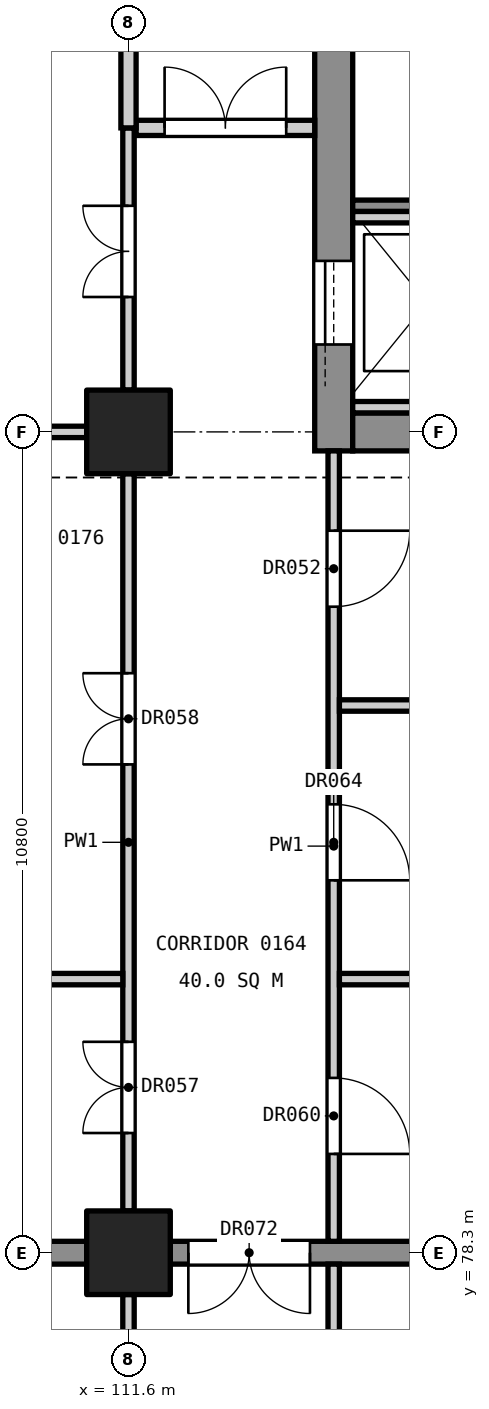
"""IFC4 building model, lengths in metres.
Left out: names, types, materials, properties, quantities, classifications, styles, units other than length and angle.
Written with IfcOpenShell. Run it as: python <this file> out.ifc"""

import sys

from ifc_helpers import new_model, si_unit, direction, frame, frame_2d, origin, origin_2d, place, context, subcontext, project, spatial, rectangle, extrude, element, fill, save


model = new_model("IFC4")
c1 = context("Model", 3, precision=1e-05, world=origin(), true_north=direction((0.0, 1.0)))
c2 = subcontext(c1, "Body", "Model", "MODEL_VIEW")
j1 = project(units=[si_unit("LENGTHUNIT", "METRE"), si_unit("PLANEANGLEUNIT", "RADIAN")], contexts=[c1])
p1 = place(None, origin())
s1 = spatial("IfcSite", under=j1, at=p1, CompositionType="ELEMENT")
p2 = place(p1, origin())
s2 = spatial("IfcBuilding", under=s1, at=p2, CompositionType="ELEMENT")
p3 = place(p2, frame((0.0, 0.0, 6.0)))
s3 = spatial("IfcBuildingStorey", under=s2, at=p3, CompositionType="ELEMENT", Elevation=6.0)
for number, where, z_axis, x_axis in (
    (1, (111.6, 78.3, 0.0), (0.0, 0.0, 1.0), (1.0, 0.0, 0.0)),
    (2, (111.6, 89.1, 0.0), (0.0, 0.0, 1.0), (1.0, 0.0, 0.0)),
):
    element("IfcColumn", number, at=place(p3, frame(where, z_axis=z_axis, x_axis=x_axis)), inside=s3, PredefinedType="COLUMN", context=c2, shape_type="SweptSolid", body=[
        extrude(rectangle(XDim=1.1, YDim=1.1, at=origin_2d()), origin(), (0.0, 0.0, 1.0), 5.4),
    ])
p4 = place(p3, frame((114.3, 88.85, 0.0), z_axis=(0.0, 0.0, 1.0), x_axis=(0.0, 1.0, 0.0)))
e3 = element("IfcWall", 3, at=p4, inside=s3, PredefinedType="SHEAR", context=c2, shape_type="SweptSolid", body=[
    extrude(rectangle(XDim=11.3, YDim=0.5, at=frame_2d((5.65, 0.0))), origin(), (0.0, 0.0, 1.0), 5.1),
])
p5 = place(p4, frame((9.35, 0.0, 0.0)))
e4 = element("IfcOpeningElement", 4, at=p5, cuts=e3, PredefinedType="OPENING", context=c2, shape_type="SweptSolid", body=[
    extrude(rectangle(XDim=1.4, YDim=2.1, at=frame_2d((0.7, 1.05))), frame((0.0, 0.26, 0.0), z_axis=(0.0, -1.0, 0.0), x_axis=(1.0, 0.0, 0.0)), (0.0, 0.0, 1.0), 0.52),
])
p6 = place(p4, frame((1.4, 0.0, 0.0)))
e5 = element("IfcOpeningElement", 5, at=p6, cuts=e3, PredefinedType="OPENING", context=c2, shape_type="SweptSolid", body=[
    extrude(rectangle(XDim=1.1, YDim=2.1, at=frame_2d((0.55, 1.05))), frame((0.0, 0.26, 0.0), z_axis=(0.0, -1.0, 0.0), x_axis=(1.0, 0.0, 0.0)), (0.0, 0.0, 1.0), 0.52),
])
p7 = place(p3, frame((118.55, 89.1, 0.0), z_axis=(0.0, 0.0, 1.0), x_axis=(-1.0, 0.0, 0.0)))
e6 = element("IfcWall", 6, at=p7, inside=s3, PredefinedType="SHEAR", context=c2, shape_type="SweptSolid", body=[
    extrude(rectangle(XDim=4.0, YDim=0.5, at=frame_2d((2.0, 0.0))), origin(), (0.0, 0.0, 1.0), 5.1),
])
p8 = place(p3, frame((118.25, 78.3, 0.0), z_axis=(0.0, 0.0, 1.0), x_axis=(-1.0, 0.0, 0.0)))
e7 = element("IfcWall", 7, at=p8, inside=s3, PredefinedType="SHEAR", context=c2, shape_type="SweptSolid", body=[
    extrude(rectangle(XDim=6.1, YDim=0.3, at=frame_2d((3.05, 0.0))), origin(), (0.0, 0.0, 1.0), 5.1),
])
p9 = place(p8, frame((4.262, 0.0, 0.0)))
e8 = element("IfcOpeningElement", 8, at=p9, cuts=e7, PredefinedType="OPENING", context=c2, shape_type="SweptSolid", body=[
    extrude(rectangle(XDim=1.6, YDim=2.1, at=frame_2d((0.8, 1.05))), frame((0.0, 0.16, 0.0), z_axis=(0.0, -1.0, 0.0), x_axis=(1.0, 0.0, 0.0)), (0.0, 0.0, 1.0), 0.32),
])
p10 = place(p3, frame((111.05, 78.3, 0.0), z_axis=(0.0, 0.0, 1.0), x_axis=(-1.0, 0.0, 0.0)))
e9 = element("IfcWall", 9, at=p10, inside=s3, PredefinedType="SHEAR", context=c2, shape_type="SweptSolid", body=[
    extrude(rectangle(XDim=9.7, YDim=0.3, at=frame_2d((4.85, 0.0))), origin(), (0.0, 0.0, 1.0), 5.1),
])
p11 = place(p3, frame((118.55, 92.075, 0.0), z_axis=(0.0, 0.0, 1.0), x_axis=(-1.0, 0.0, 0.0)))
e10 = element("IfcWall", 10, at=p11, inside=s3, PredefinedType="SOLIDWALL", context=c2, shape_type="SweptSolid", body=[
    extrude(rectangle(XDim=4.0, YDim=0.15, at=frame_2d((2.0, 0.0))), origin(), (0.0, 0.0, 1.0), 5.1),
])
for number, where, z_axis, x_axis in (
    (11, (116.35, 91.925, 0.0), (0.0, 0.0, 1.0), (-1.0, 0.0, 0.0)),
    (12, (116.35, 89.425, 0.0), (0.0, 0.0, 1.0), (-1.0, 0.0, 0.0)),
):
    element("IfcWall", number, at=place(p3, frame(where, z_axis=z_axis, x_axis=x_axis)), inside=s3, PredefinedType="SOLIDWALL", context=c2, shape_type="SweptSolid", body=[
        extrude(rectangle(XDim=1.8, YDim=0.15, at=frame_2d((0.9, 0.0))), origin(), (0.0, 0.0, 1.0), 5.4),
    ])
p12 = place(p3, frame((114.3, 74.95, 0.0), z_axis=(0.0, 0.0, 1.0), x_axis=(0.0, 1.0, 0.0)))
e13 = element("IfcWall", 13, at=p12, inside=s3, PredefinedType="PARTITIONING", context=c2, shape_type="SweptSolid", body=[
    extrude(rectangle(XDim=3.2, YDim=0.15, at=frame_2d((1.6, 0.0))), origin(), (0.0, 0.0, 1.0), 4.0),
])
p13 = place(p12, frame((1.05, 0.0, 0.0)))
e14 = element("IfcOpeningElement", 14, at=p13, cuts=e13, PredefinedType="OPENING", context=c2, shape_type="SweptSolid", body=[
    extrude(rectangle(XDim=1.0, YDim=2.1, at=frame_2d((0.5, 1.05))), frame((0.0, 0.085, 0.0), z_axis=(0.0, -1.0, 0.0), x_axis=(1.0, 0.0, 0.0)), (0.0, 0.0, 1.0), 0.17),
])
p14 = place(p3, frame((114.3, 78.45, 0.0), z_axis=(0.0, 0.0, 1.0), x_axis=(0.0, 1.0, 0.0)))
e15 = element("IfcWall", 15, at=p14, inside=s3, PredefinedType="PARTITIONING", context=c2, shape_type="SweptSolid", body=[
    extrude(rectangle(XDim=10.4, YDim=0.15, at=frame_2d((5.2, 0.0))), origin(), (0.0, 0.0, 1.0), 4.0),
])
p15 = place(p14, frame((8.35, 0.0, 0.0)))
e16 = element("IfcOpeningElement", 16, at=p15, cuts=e15, PredefinedType="OPENING", context=c2, shape_type="SweptSolid", body=[
    extrude(rectangle(XDim=1.0, YDim=2.1, at=frame_2d((0.5, 1.05))), frame((0.0, 0.085, 0.0), z_axis=(0.0, -1.0, 0.0), x_axis=(1.0, 0.0, 0.0)), (0.0, 0.0, 1.0), 0.17),
])
p16 = place(p14, frame((1.15, 0.0, 0.0)))
e17 = element("IfcOpeningElement", 17, at=p16, cuts=e15, PredefinedType="OPENING", context=c2, shape_type="SweptSolid", body=[
    extrude(rectangle(XDim=1.0, YDim=2.1, at=frame_2d((0.5, 1.05))), frame((0.0, 0.085, 0.0), z_axis=(0.0, -1.0, 0.0), x_axis=(1.0, 0.0, 0.0)), (0.0, 0.0, 1.0), 0.17),
])
p17 = place(p14, frame((4.75, 0.0, 0.0)))
e18 = element("IfcOpeningElement", 18, at=p17, cuts=e15, PredefinedType="OPENING", context=c2, shape_type="SweptSolid", body=[
    extrude(rectangle(XDim=1.0, YDim=2.1, at=frame_2d((0.5, 1.05))), frame((0.0, 0.085, 0.0), z_axis=(0.0, -1.0, 0.0), x_axis=(1.0, 0.0, 0.0)), (0.0, 0.0, 1.0), 0.17),
])
for number, where, z_axis, x_axis in (
    (19, (118.65, 81.9, 0.0), (0.0, 0.0, 1.0), (-1.0, 0.0, 0.0)),
    (20, (118.65, 85.5, 0.0), (0.0, 0.0, 1.0), (-1.0, 0.0, 0.0)),
):
    element("IfcWall", number, at=place(p3, frame(where, z_axis=z_axis, x_axis=x_axis)), inside=s3, PredefinedType="PARTITIONING", context=c2, shape_type="SweptSolid", body=[
        extrude(rectangle(XDim=4.275, YDim=0.15, at=frame_2d((2.137, 0.0))), origin(), (0.0, 0.0, 1.0), 4.3),
    ])
p18 = place(p3, frame((114.05, 93.1, 0.0), z_axis=(0.0, 0.0, 1.0), x_axis=(-1.0, 0.0, 0.0)))
e21 = element("IfcWall", 21, at=p18, inside=s3, PredefinedType="PARTITIONING", context=c2, shape_type="SweptSolid", body=[
    extrude(rectangle(XDim=2.35, YDim=0.2, at=frame_2d((1.175, 0.0))), origin(), (0.0, 0.0, 1.0), 4.0),
])
p19 = place(p18, frame((0.375, 0.0, 0.0)))
e22 = element("IfcOpeningElement", 22, at=p19, cuts=e21, PredefinedType="OPENING", context=c2, shape_type="SweptSolid", body=[
    extrude(rectangle(XDim=1.6, YDim=2.1, at=frame_2d((0.8, 1.05))), frame((0.0, 0.11, 0.0), z_axis=(0.0, -1.0, 0.0), x_axis=(1.0, 0.0, 0.0)), (0.0, 0.0, 1.0), 0.22),
])
p20 = place(p3, frame((111.6, 70.8, 0.0), z_axis=(0.0, 0.0, 1.0), x_axis=(0.0, 1.0, 0.0)))
e23 = element("IfcWall", 23, at=p20, inside=s3, PredefinedType="PARTITIONING", context=c2, shape_type="SweptSolid", body=[
    extrude(rectangle(XDim=6.95, YDim=0.15, at=frame_2d((3.475, 0.0))), origin(), (0.0, 0.0, 1.0), 4.0),
])
p21 = place(p20, frame((3.125, 0.0, 0.0)))
e24 = element("IfcOpeningElement", 24, at=p21, cuts=e23, PredefinedType="OPENING", context=c2, shape_type="SweptSolid", body=[
    extrude(rectangle(XDim=1.2, YDim=2.1, at=frame_2d((0.6, 1.05))), frame((0.0, 0.085, 0.0), z_axis=(0.0, -1.0, 0.0), x_axis=(1.0, 0.0, 0.0)), (0.0, 0.0, 1.0), 0.17),
])
p22 = place(p3, frame((111.6, 78.85, 0.0), z_axis=(0.0, 0.0, 1.0), x_axis=(0.0, 1.0, 0.0)))
e25 = element("IfcWall", 25, at=p22, inside=s3, PredefinedType="PARTITIONING", context=c2, shape_type="SweptSolid", body=[
    extrude(rectangle(XDim=9.7, YDim=0.15, at=frame_2d((4.85, 0.0))), origin(), (0.0, 0.0, 1.0), 4.0),
])
p23 = place(p22, frame((1.025, 0.0, 0.0)))
e26 = element("IfcOpeningElement", 26, at=p23, cuts=e25, PredefinedType="OPENING", context=c2, shape_type="SweptSolid", body=[
    extrude(rectangle(XDim=1.2, YDim=2.1, at=frame_2d((0.6, 1.05))), frame((0.0, 0.085, 0.0), z_axis=(0.0, -1.0, 0.0), x_axis=(1.0, 0.0, 0.0)), (0.0, 0.0, 1.0), 0.17),
])
p24 = place(p22, frame((5.875, 0.0, 0.0)))
e27 = element("IfcOpeningElement", 27, at=p24, cuts=e25, PredefinedType="OPENING", context=c2, shape_type="SweptSolid", body=[
    extrude(rectangle(XDim=1.2, YDim=2.1, at=frame_2d((0.6, 1.05))), frame((0.0, 0.085, 0.0), z_axis=(0.0, -1.0, 0.0), x_axis=(1.0, 0.0, 0.0)), (0.0, 0.0, 1.0), 0.17),
])
p25 = place(p3, frame((111.6, 89.65, 0.0), z_axis=(0.0, 0.0, 1.0), x_axis=(0.0, 1.0, 0.0)))
e28 = element("IfcWall", 28, at=p25, inside=s3, PredefinedType="PARTITIONING", context=c2, shape_type="SweptSolid", body=[
    extrude(rectangle(XDim=3.45, YDim=0.15, at=frame_2d((1.725, 0.0))), origin(), (0.0, 0.0, 1.0), 4.0),
])
p26 = place(p25, frame((1.225, 0.0, 0.0)))
e29 = element("IfcOpeningElement", 29, at=p26, cuts=e28, PredefinedType="OPENING", context=c2, shape_type="SweptSolid", body=[
    extrude(rectangle(XDim=1.2, YDim=2.1, at=frame_2d((0.6, 1.05))), frame((0.0, 0.085, 0.0), z_axis=(0.0, -1.0, 0.0), x_axis=(1.0, 0.0, 0.0)), (0.0, 0.0, 1.0), 0.17),
])
p27 = place(p3, frame((111.6, 93.1, 0.0), z_axis=(0.0, 0.0, 1.0), x_axis=(0.0, 1.0, 0.0)))
e30 = element("IfcWall", 30, at=p27, inside=s3, PredefinedType="PARTITIONING", context=c2, shape_type="SweptSolid", body=[
    extrude(rectangle(XDim=6.25, YDim=0.2, at=frame_2d((3.125, 0.0))), origin(), (0.0, 0.0, 1.0), 4.0),
])
p28 = place(p3, frame((111.525, 81.9, 0.0), z_axis=(0.0, 0.0, 1.0), x_axis=(-1.0, 0.0, 0.0)))
e31 = element("IfcWall", 31, at=p28, inside=s3, PredefinedType="PARTITIONING", context=c2, shape_type="SweptSolid", body=[
    extrude(rectangle(XDim=10.575, YDim=0.15, at=frame_2d((5.288, 0.0))), origin(), (0.0, 0.0, 1.0), 4.3),
])
p29 = place(p3, frame((111.05, 89.1, 0.0), z_axis=(0.0, 0.0, 1.0), x_axis=(-1.0, 0.0, 0.0)))
e32 = element("IfcWall", 32, at=p29, inside=s3, PredefinedType="PARTITIONING", context=c2, shape_type="SweptSolid", body=[
    extrude(rectangle(XDim=9.7, YDim=0.15, at=frame_2d((4.85, 0.0))), origin(), (0.0, 0.0, 1.0), 4.3),
])
p30 = place(p6, origin())
e33 = element("IfcDoor", 33, at=p30, inside=s3, OperationType="SLIDING_TO_LEFT", PredefinedType="DOOR", context=c2, shape_type="SweptSolid", body=[
    extrude(rectangle(XDim=1.1, YDim=2.1, at=frame_2d((0.55, 1.05))), frame((0.0, 0.025, 0.0), z_axis=(0.0, -1.0, 0.0), x_axis=(1.0, 0.0, 0.0)), (0.0, 0.0, 1.0), 0.05),
])
fill(e5, e33)
p31 = place(p15, frame((1.0, 0.0, 0.0), z_axis=(0.0, 0.0, 1.0), x_axis=(-1.0, 0.0, 0.0)))
e34 = element("IfcDoor", 34, at=p31, inside=s3, OperationType="SINGLE_SWING_LEFT", PredefinedType="DOOR", context=c2, shape_type="SweptSolid", body=[
    extrude(rectangle(XDim=1.0, YDim=2.1, at=frame_2d((0.5, 1.05))), frame((0.0, 0.025, 0.0), z_axis=(0.0, -1.0, 0.0), x_axis=(1.0, 0.0, 0.0)), (0.0, 0.0, 1.0), 0.05),
])
fill(e16, e34)
p32 = place(p23, origin())
e35 = element("IfcDoor", 35, at=p32, inside=s3, OperationType="DOUBLE_DOOR_SINGLE_SWING", PredefinedType="DOOR", context=c2, shape_type="SweptSolid", body=[
    extrude(rectangle(XDim=1.2, YDim=2.1, at=frame_2d((0.6, 1.05))), frame((0.0, 0.025, 0.0), z_axis=(0.0, -1.0, 0.0), x_axis=(1.0, 0.0, 0.0)), (0.0, 0.0, 1.0), 0.05),
])
fill(e26, e35)
p33 = place(p24, origin())
e36 = element("IfcDoor", 36, at=p33, inside=s3, OperationType="DOUBLE_DOOR_SINGLE_SWING", PredefinedType="DOOR", context=c2, shape_type="SweptSolid", body=[
    extrude(rectangle(XDim=1.2, YDim=2.1, at=frame_2d((0.6, 1.05))), frame((0.0, 0.025, 0.0), z_axis=(0.0, -1.0, 0.0), x_axis=(1.0, 0.0, 0.0)), (0.0, 0.0, 1.0), 0.05),
])
fill(e27, e36)
p34 = place(p26, origin())
e37 = element("IfcDoor", 37, at=p34, inside=s3, OperationType="DOUBLE_DOOR_SINGLE_SWING", PredefinedType="DOOR", context=c2, shape_type="SweptSolid", body=[
    extrude(rectangle(XDim=1.2, YDim=2.1, at=frame_2d((0.6, 1.05))), frame((0.0, 0.025, 0.0), z_axis=(0.0, -1.0, 0.0), x_axis=(1.0, 0.0, 0.0)), (0.0, 0.0, 1.0), 0.05),
])
fill(e29, e37)
p35 = place(p16, frame((1.0, 0.0, 0.0), z_axis=(0.0, 0.0, 1.0), x_axis=(-1.0, 0.0, 0.0)))
e38 = element("IfcDoor", 38, at=p35, inside=s3, OperationType="SINGLE_SWING_RIGHT", PredefinedType="DOOR", context=c2, shape_type="SweptSolid", body=[
    extrude(rectangle(XDim=1.0, YDim=2.1, at=frame_2d((0.5, 1.05))), frame((0.0, 0.025, 0.0), z_axis=(0.0, -1.0, 0.0), x_axis=(1.0, 0.0, 0.0)), (0.0, 0.0, 1.0), 0.05),
])
fill(e17, e38)
p36 = place(p17, frame((1.0, 0.0, 0.0), z_axis=(0.0, 0.0, 1.0), x_axis=(-1.0, 0.0, 0.0)))
e39 = element("IfcDoor", 39, at=p36, inside=s3, OperationType="SINGLE_SWING_RIGHT", PredefinedType="DOOR", context=c2, shape_type="SweptSolid", body=[
    extrude(rectangle(XDim=1.0, YDim=2.1, at=frame_2d((0.5, 1.05))), frame((0.0, 0.025, 0.0), z_axis=(0.0, -1.0, 0.0), x_axis=(1.0, 0.0, 0.0)), (0.0, 0.0, 1.0), 0.05),
])
fill(e18, e39)
p37 = place(p19, frame((1.6, 0.0, 0.0), z_axis=(0.0, 0.0, 1.0), x_axis=(-1.0, 0.0, 0.0)))
e40 = element("IfcDoor", 40, at=p37, inside=s3, OperationType="DOUBLE_DOOR_SINGLE_SWING", PredefinedType="DOOR", context=c2, shape_type="SweptSolid", body=[
    extrude(rectangle(XDim=1.6, YDim=2.1, at=frame_2d((0.8, 1.05))), frame((0.0, 0.025, 0.0), z_axis=(0.0, -1.0, 0.0), x_axis=(1.0, 0.0, 0.0)), (0.0, 0.0, 1.0), 0.05),
])
fill(e22, e40)
p38 = place(p9, origin())
e41 = element("IfcDoor", 41, at=p38, inside=s3, OperationType="DOUBLE_DOOR_SINGLE_SWING", PredefinedType="DOOR", context=c2, shape_type="SweptSolid", body=[
    extrude(rectangle(XDim=1.6, YDim=2.1, at=frame_2d((0.8, 1.05))), frame((0.0, 0.025, 0.0), z_axis=(0.0, -1.0, 0.0), x_axis=(1.0, 0.0, 0.0)), (0.0, 0.0, 1.0), 0.05),
])
fill(e8, e41)
save(model, sys.argv[1])
